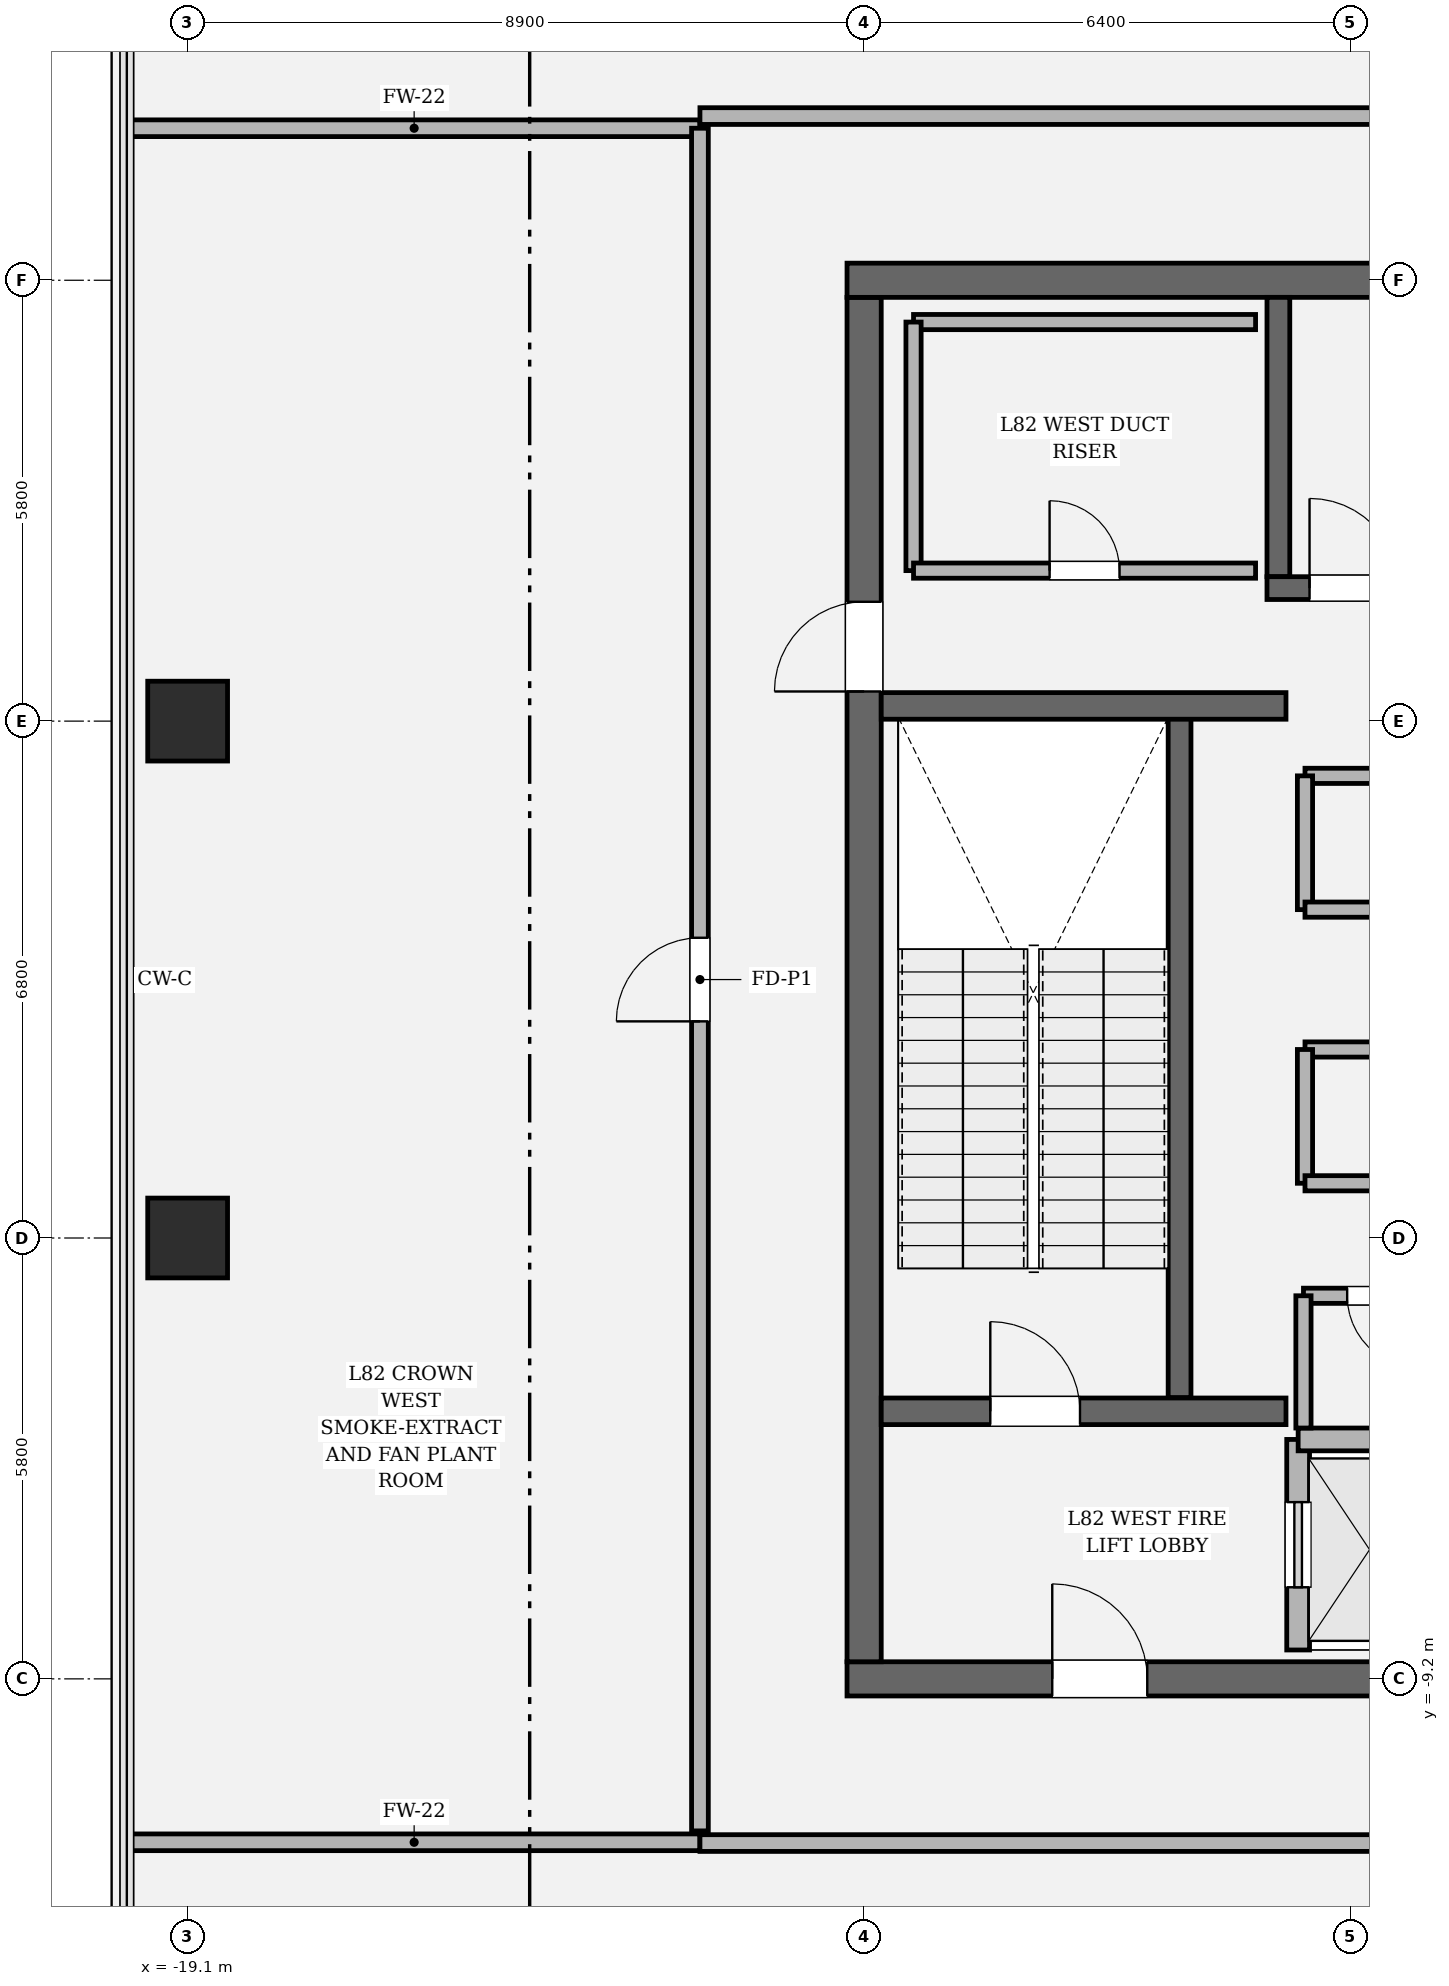
"""IFC4 building model, lengths in metres.
Left out: names, types, materials, properties, quantities, classifications, styles, units other than length and angle.
Written with IfcOpenShell. Run it as: python <this file> out.ifc"""

import sys

from ifc_helpers import new_model, si_unit, direction, frame, frame_2d, origin, origin_2d, place, context, subcontext, project, spatial, rectangle, hollow_rectangle, extrude, element, fill, save


model = new_model("IFC4")
c1 = context("Model", 3, precision=1e-05, world=origin(), true_north=direction((0.0, 1.0)))
c2 = subcontext(c1, "Body", "Model", "MODEL_VIEW")
j1 = project(units=[si_unit("LENGTHUNIT", "METRE"), si_unit("PLANEANGLEUNIT", "RADIAN")], contexts=[c1])
p1 = place(None, origin())
s1 = spatial("IfcSite", under=j1, at=p1, CompositionType="ELEMENT")
p2 = place(p1, origin())
s2 = spatial("IfcBuilding", under=s1, at=p2, CompositionType="ELEMENT")
p3 = place(p2, frame((0.0, 0.0, 348.3)))
s3 = spatial("IfcBuildingStorey", under=s2, at=p3, CompositionType="ELEMENT", Elevation=348.3)
p4 = place(p3, frame((10.425, -9.2, 0.0), z_axis=(0.0, 0.0, 1.0), x_axis=(-1.0, 0.0, 0.0)))
e1 = element("IfcWall", 1, at=p4, inside=s3, PredefinedType="SHEAR", context=c2, shape_type="SweptSolid", body=[
    extrude(rectangle(XDim=20.85, YDim=0.45, at=frame_2d((10.425, 0.0))), origin(), (0.0, 0.0, 1.0), 4.5),
])
p5 = place(p4, frame((2.7, 0.0, 0.0)))
e2 = element("IfcOpeningElement", 2, at=p5, cuts=e1, PredefinedType="OPENING", context=c2, shape_type="SweptSolid", body=[
    extrude(rectangle(XDim=1.25, YDim=2.25, at=frame_2d((0.625, 1.125))), frame((0.0, 0.235, 0.0), z_axis=(0.0, -1.0, 0.0), x_axis=(1.0, 0.0, 0.0)), (0.0, 0.0, 1.0), 0.47),
])
p6 = place(p4, frame((16.9, 0.0, 0.0)))
e3 = element("IfcOpeningElement", 3, at=p6, cuts=e1, PredefinedType="OPENING", context=c2, shape_type="SweptSolid", body=[
    extrude(rectangle(XDim=1.25, YDim=2.25, at=frame_2d((0.625, 1.125))), frame((0.0, 0.235, 0.0), z_axis=(0.0, -1.0, 0.0), x_axis=(1.0, 0.0, 0.0)), (0.0, 0.0, 1.0), 0.47),
])
p7 = place(p3, frame((-10.2, -8.975, 0.0), z_axis=(0.0, 0.0, 1.0), x_axis=(0.0, 1.0, 0.0)))
e4 = element("IfcWall", 4, at=p7, inside=s3, PredefinedType="SHEAR", context=c2, shape_type="SweptSolid", body=[
    extrude(rectangle(XDim=17.95, YDim=0.45, at=frame_2d((8.975, 0.0))), origin(), (0.0, 0.0, 1.0), 4.5),
])
p8 = place(p7, frame((12.765, 0.0, 0.0)))
e5 = element("IfcOpeningElement", 5, at=p8, cuts=e4, PredefinedType="OPENING", context=c2, shape_type="SweptSolid", body=[
    extrude(rectangle(XDim=1.18, YDim=2.2, at=frame_2d((0.59, 1.1))), frame((0.0, 0.235, 0.0), z_axis=(0.0, -1.0, 0.0), x_axis=(1.0, 0.0, 0.0)), (0.0, 0.0, 1.0), 0.47),
])
p9 = place(p3, frame((-10.425, 9.2, 0.0), z_axis=(0.0, 0.0, 1.0), x_axis=(1.0, 0.0, 0.0)))
e6 = element("IfcWall", 6, at=p9, inside=s3, PredefinedType="SHEAR", context=c2, shape_type="SweptSolid", body=[
    extrude(rectangle(XDim=20.85, YDim=0.45, at=frame_2d((10.425, 0.0))), origin(), (0.0, 0.0, 1.0), 4.5),
])
p10 = place(p3, frame((-6.05, -5.5, 0.0), z_axis=(0.0, 0.0, 1.0), x_axis=(0.0, 1.0, 0.0)))
e7 = element("IfcWall", 7, at=p10, inside=s3, PredefinedType="SOLIDWALL", context=c2, shape_type="SweptSolid", body=[
    extrude(rectangle(XDim=8.95, YDim=0.3, at=frame_2d((4.475, 0.0))), origin(), (0.0, 0.0, 1.0), 4.5),
])
p11 = place(p3, frame((-4.75, 5.3, 0.0), z_axis=(0.0, 0.0, 1.0), x_axis=(0.0, 1.0, 0.0)))
e8 = element("IfcWall", 8, at=p11, inside=s3, PredefinedType="SOLIDWALL", context=c2, shape_type="SweptSolid", body=[
    extrude(rectangle(XDim=3.675, YDim=0.3, at=frame_2d((1.837, 0.0))), origin(), (0.0, 0.0, 1.0), 4.5),
])
p12 = place(p3, frame((-4.9, 5.15, 0.0), z_axis=(0.0, 0.0, 1.0), x_axis=(1.0, 0.0, 0.0)))
e9 = element("IfcWall", 9, at=p12, inside=s3, PredefinedType="SOLIDWALL", context=c2, shape_type="SweptSolid", body=[
    extrude(rectangle(XDim=9.8, YDim=0.3, at=frame_2d((4.9, 0.0))), origin(), (0.0, 0.0, 1.0), 4.5),
])
p13 = place(p12, frame((0.56, 0.0, 0.0)))
e10 = element("IfcOpeningElement", 10, at=p13, cuts=e9, PredefinedType="OPENING", context=c2, shape_type="SweptSolid", body=[
    extrude(rectangle(XDim=1.18, YDim=2.2, at=frame_2d((0.59, 1.1))), frame((0.0, 0.16, 0.0), z_axis=(0.0, -1.0, 0.0), x_axis=(1.0, 0.0, 0.0)), (0.0, 0.0, 1.0), 0.32),
])
p14 = place(p3, frame((-9.975, -5.68, 0.0), z_axis=(0.0, 0.0, 1.0), x_axis=(1.0, 0.0, 0.0)))
e11 = element("IfcWall", 11, at=p14, inside=s3, PredefinedType="SOLIDWALL", context=c2, shape_type="SweptSolid", body=[
    extrude(rectangle(XDim=5.325, YDim=0.35, at=frame_2d((2.663, 0.0))), origin(), (0.0, 0.0, 1.0), 4.5),
])
p15 = place(p14, frame((1.435, 0.0, 0.0)))
e12 = element("IfcOpeningElement", 12, at=p15, cuts=e11, PredefinedType="OPENING", context=c2, shape_type="SweptSolid", body=[
    extrude(rectangle(XDim=1.18, YDim=2.2, at=frame_2d((0.59, 1.1))), frame((0.0, 0.185, 0.0), z_axis=(0.0, -1.0, 0.0), x_axis=(1.0, 0.0, 0.0)), (0.0, 0.0, 1.0), 0.37),
])
p16 = place(p3, frame((-9.975, 3.6, 0.0), z_axis=(0.0, 0.0, 1.0), x_axis=(1.0, 0.0, 0.0)))
e13 = element("IfcWall", 13, at=p16, inside=s3, PredefinedType="SOLIDWALL", context=c2, shape_type="SweptSolid", body=[
    extrude(rectangle(XDim=5.325, YDim=0.35, at=frame_2d((2.663, 0.0))), origin(), (0.0, 0.0, 1.0), 4.5),
])
for number, where, z_axis, x_axis in (
    (14, (-19.1, 3.4, 0.0), (0.0, 0.0, 1.0), (1.0, 0.0, 0.0)),
    (15, (-19.1, -3.4, 0.0), (0.0, 0.0, 1.0), (1.0, 0.0, 0.0)),
):
    element("IfcColumn", number, at=place(p3, frame(where, z_axis=z_axis, x_axis=x_axis)), inside=s3, PredefinedType="COLUMN", context=c2, shape_type="SweptSolid", body=[
        extrude(hollow_rectangle(XDim=1.05, YDim=1.05, WallThickness=0.03, at=origin_2d()), origin(), (0.0, 0.0, 1.0), 4.5),
    ])
p17 = place(p3, frame((-4.49, -8.82, 0.0), z_axis=(0.0, 0.0, 1.0), x_axis=(0.0, 1.0, 0.0)))
e16 = element("IfcWall", 16, at=p17, inside=s3, PredefinedType="SOLIDWALL", context=c2, shape_type="SweptSolid", body=[
    extrude(rectangle(XDim=2.77, YDim=0.3, at=frame_2d((1.385, 0.0))), origin(), (0.0, 0.0, 1.0), 4.22),
])
p18 = place(p17, frame((0.825, 0.0, 0.0)))
e17 = element("IfcOpeningElement", 17, at=p18, cuts=e16, PredefinedType="OPENING", context=c2, shape_type="SweptSolid", body=[
    extrude(rectangle(XDim=1.12, YDim=2.25, at=frame_2d((0.56, 1.125))), frame((0.0, 0.16, 0.0), z_axis=(0.0, -1.0, 0.0), x_axis=(1.0, 0.0, 0.0)), (0.0, 0.0, 1.0), 0.32),
])
p19 = place(p3, frame((-4.49, -6.05, 0.0), z_axis=(0.0, 0.0, 1.0), x_axis=(1.0, 0.0, 0.0)))
e18 = element("IfcWall", 18, at=p19, inside=s3, PredefinedType="SOLIDWALL", context=c2, shape_type="SweptSolid", body=[
    extrude(rectangle(XDim=1.88, YDim=0.3, at=frame_2d((0.94, 0.0))), origin(), (0.0, 0.0, 1.0), 4.22),
])
p20 = place(p3, frame((-2.32, -4.16, 0.0), z_axis=(0.0, 0.0, 1.0), x_axis=(-1.0, 0.0, 0.0)))
e19 = element("IfcWall", 19, at=p20, inside=s3, PredefinedType="SOLIDWALL", context=c2, shape_type="SweptSolid", body=[
    extrude(rectangle(XDim=2.1, YDim=0.2, at=frame_2d((1.05, 0.0))), origin(), (0.0, 0.0, 1.0), 4.22),
])
p21 = place(p20, frame((0.575, 0.0, 0.0)))
e20 = element("IfcOpeningElement", 20, at=p21, cuts=e19, PredefinedType="OPENING", context=c2, shape_type="SweptSolid", body=[
    extrude(rectangle(XDim=0.95, YDim=2.15, at=frame_2d((0.475, 1.075))), frame((0.0, 0.11, 0.0), z_axis=(0.0, -1.0, 0.0), x_axis=(1.0, 0.0, 0.0)), (0.0, 0.0, 1.0), 0.22),
])
p22 = place(p3, frame((-4.42, -4.16, 0.0), z_axis=(0.0, 0.0, 1.0), x_axis=(0.0, -1.0, 0.0)))
e21 = element("IfcWall", 21, at=p22, inside=s3, PredefinedType="SOLIDWALL", context=c2, shape_type="SweptSolid", body=[
    extrude(rectangle(XDim=1.74, YDim=0.2, at=frame_2d((0.87, 0.0))), origin(), (0.0, 0.0, 1.0), 4.22),
])
p23 = place(p3, frame((4.4, -0.92, 0.0), z_axis=(0.0, 0.0, 1.0), x_axis=(-1.0, 0.0, 0.0)))
e22 = element("IfcWall", 22, at=p23, inside=s3, PredefinedType="SOLIDWALL", context=c2, shape_type="SweptSolid", body=[
    extrude(rectangle(XDim=8.8, YDim=0.2, at=frame_2d((4.4, 0.0))), origin(), (0.0, 0.0, 1.0), 4.22),
])
p24 = place(p3, frame((-4.4, -0.92, 0.0), z_axis=(0.0, 0.0, 1.0), x_axis=(0.0, -1.0, 0.0)))
e23 = element("IfcWall", 23, at=p24, inside=s3, PredefinedType="SOLIDWALL", context=c2, shape_type="SweptSolid", body=[
    extrude(rectangle(XDim=1.76, YDim=0.2, at=frame_2d((0.88, 0.0))), origin(), (0.0, 0.0, 1.0), 4.22),
])
for number, where, z_axis, x_axis in (
    (24, (-4.4, -2.68, 0.0), (0.0, 0.0, 1.0), (1.0, 0.0, 0.0)),
    (25, (4.4, 2.68, 0.0), (0.0, 0.0, 1.0), (-1.0, 0.0, 0.0)),
):
    element("IfcWall", number, at=place(p3, frame(where, z_axis=z_axis, x_axis=x_axis)), inside=s3, PredefinedType="SOLIDWALL", context=c2, shape_type="SweptSolid", body=[
        extrude(rectangle(XDim=8.8, YDim=0.2, at=frame_2d((4.4, 0.0))), origin(), (0.0, 0.0, 1.0), 4.22),
    ])
p25 = place(p3, frame((-4.4, 2.68, 0.0), z_axis=(0.0, 0.0, 1.0), x_axis=(0.0, -1.0, 0.0)))
e26 = element("IfcWall", 26, at=p25, inside=s3, PredefinedType="SOLIDWALL", context=c2, shape_type="SweptSolid", body=[
    extrude(rectangle(XDim=1.76, YDim=0.2, at=frame_2d((0.88, 0.0))), origin(), (0.0, 0.0, 1.0), 4.22),
])
p26 = place(p3, frame((-4.4, 0.92, 0.0), z_axis=(0.0, 0.0, 1.0), x_axis=(1.0, 0.0, 0.0)))
e27 = element("IfcWall", 27, at=p26, inside=s3, PredefinedType="SOLIDWALL", context=c2, shape_type="SweptSolid", body=[
    extrude(rectangle(XDim=8.8, YDim=0.2, at=frame_2d((4.4, 0.0))), origin(), (0.0, 0.0, 1.0), 4.22),
])
p27 = place(p3, frame((-5.05, 8.65, 0.0), z_axis=(0.0, 0.0, 1.0), x_axis=(-1.0, 0.0, 0.0)))
e28 = element("IfcWall", 28, at=p27, inside=s3, PredefinedType="SOLIDWALL", context=c2, shape_type="SweptSolid", body=[
    extrude(rectangle(XDim=4.5, YDim=0.2, at=frame_2d((2.25, 0.0))), origin(), (0.0, 0.0, 1.0), 4.22),
])
p28 = place(p3, frame((-9.55, 8.65, 0.0), z_axis=(0.0, 0.0, 1.0), x_axis=(0.0, -1.0, 0.0)))
e29 = element("IfcWall", 29, at=p28, inside=s3, PredefinedType="SOLIDWALL", context=c2, shape_type="SweptSolid", body=[
    extrude(rectangle(XDim=3.27, YDim=0.2, at=frame_2d((1.635, 0.0))), origin(), (0.0, 0.0, 1.0), 4.22),
])
p29 = place(p3, frame((-9.55, 5.38, 0.0), z_axis=(0.0, 0.0, 1.0), x_axis=(1.0, 0.0, 0.0)))
e30 = element("IfcWall", 30, at=p29, inside=s3, PredefinedType="SOLIDWALL", context=c2, shape_type="SweptSolid", body=[
    extrude(rectangle(XDim=4.5, YDim=0.2, at=frame_2d((2.25, 0.0))), origin(), (0.0, 0.0, 1.0), 4.22),
])
p30 = place(p29, frame((1.79, 0.0, 0.0)))
e31 = element("IfcOpeningElement", 31, at=p30, cuts=e30, PredefinedType="OPENING", context=c2, shape_type="SweptSolid", body=[
    extrude(rectangle(XDim=0.92, YDim=2.1, at=frame_2d((0.46, 1.05))), frame((0.0, 0.11, 0.0), z_axis=(0.0, -1.0, 0.0), x_axis=(1.0, 0.0, 0.0)), (0.0, 0.0, 1.0), 0.22),
])
p31 = place(p3, frame((-19.88, -11.35, 0.0), z_axis=(0.0, 0.0, 1.0), x_axis=(1.0, 0.0, 0.0)))
e32 = element("IfcWall", 32, at=p31, inside=s3, PredefinedType="SOLIDWALL", context=c2, shape_type="SweptSolid", body=[
    extrude(rectangle(XDim=7.52, YDim=0.22, at=frame_2d((3.76, 0.0))), origin(), (0.0, 0.0, 1.0), 2.934),
])
p32 = place(p3, frame((-12.36, -11.36, 0.0), z_axis=(0.0, 0.0, 1.0), x_axis=(1.0, 0.0, 0.0)))
e33 = element("IfcWall", 33, at=p32, inside=s3, PredefinedType="SOLIDWALL", context=c2, shape_type="SweptSolid", body=[
    extrude(rectangle(XDim=24.72, YDim=0.22, at=frame_2d((12.36, 0.0))), origin(), (0.0, 0.0, 1.0), 2.934),
])
p33 = place(p32, frame((11.81, 0.0, 0.0)))
e34 = element("IfcOpeningElement", 34, at=p33, cuts=e33, PredefinedType="OPENING", context=c2, shape_type="SweptSolid", body=[
    extrude(rectangle(XDim=1.1, YDim=2.2, at=frame_2d((0.55, 1.1))), frame((0.0, 0.12, 0.0), z_axis=(0.0, -1.0, 0.0), x_axis=(1.0, 0.0, 0.0)), (0.0, 0.0, 1.0), 0.24),
])
p34 = place(p3, frame((-19.88, 11.2, 0.0), z_axis=(0.0, 0.0, 1.0), x_axis=(1.0, 0.0, 0.0)))
e35 = element("IfcWall", 35, at=p34, inside=s3, PredefinedType="SOLIDWALL", context=c2, shape_type="SweptSolid", body=[
    extrude(rectangle(XDim=7.52, YDim=0.22, at=frame_2d((3.76, 0.0))), origin(), (0.0, 0.0, 1.0), 2.934),
])
p35 = place(p3, frame((-12.36, 11.2, 0.0), z_axis=(0.0, 0.0, 1.0), x_axis=(0.0, -1.0, 0.0)))
e36 = element("IfcWall", 36, at=p35, inside=s3, PredefinedType="SOLIDWALL", context=c2, shape_type="SweptSolid", body=[
    extrude(rectangle(XDim=22.4, YDim=0.22, at=frame_2d((11.2, 0.0))), origin(), (0.0, 0.0, 1.0), 2.934),
])
p36 = place(p35, frame((10.65, 0.0, 0.0)))
e37 = element("IfcOpeningElement", 37, at=p36, cuts=e36, PredefinedType="OPENING", context=c2, shape_type="SweptSolid", body=[
    extrude(rectangle(XDim=1.1, YDim=2.2, at=frame_2d((0.55, 1.1))), frame((0.0, 0.12, 0.0), z_axis=(0.0, -1.0, 0.0), x_axis=(1.0, 0.0, 0.0)), (0.0, 0.0, 1.0), 0.24),
])
p37 = place(p3, frame((12.36, 11.36, 0.0), z_axis=(0.0, 0.0, 1.0), x_axis=(-1.0, 0.0, 0.0)))
e38 = element("IfcWall", 38, at=p37, inside=s3, PredefinedType="SOLIDWALL", context=c2, shape_type="SweptSolid", body=[
    extrude(rectangle(XDim=24.72, YDim=0.22, at=frame_2d((12.36, 0.0))), origin(), (0.0, 0.0, 1.0), 2.934),
])
p38 = place(p37, frame((11.81, 0.0, 0.0)))
e39 = element("IfcOpeningElement", 39, at=p38, cuts=e38, PredefinedType="OPENING", context=c2, shape_type="SweptSolid", body=[
    extrude(rectangle(XDim=1.1, YDim=2.2, at=frame_2d((0.55, 1.1))), frame((0.0, 0.12, 0.0), z_axis=(0.0, -1.0, 0.0), x_axis=(1.0, 0.0, 0.0)), (0.0, 0.0, 1.0), 0.24),
])
p39 = place(p15, origin())
e40 = element("IfcDoor", 40, at=p39, inside=s3, OperationType="SINGLE_SWING_LEFT", PredefinedType="DOOR", context=c2, shape_type="SweptSolid", body=[
    extrude(rectangle(XDim=1.18, YDim=2.2, at=frame_2d((0.59, 1.1))), frame((0.0, 0.025, 0.0), z_axis=(0.0, -1.0, 0.0), x_axis=(1.0, 0.0, 0.0)), (0.0, 0.0, 1.0), 0.05),
])
fill(e12, e40)
p40 = place(p13, origin())
e41 = element("IfcDoor", 41, at=p40, inside=s3, OperationType="SINGLE_SWING_LEFT", PredefinedType="DOOR", context=c2, shape_type="SweptSolid", body=[
    extrude(rectangle(XDim=1.18, YDim=2.2, at=frame_2d((0.59, 1.1))), frame((0.0, 0.025, 0.0), z_axis=(0.0, -1.0, 0.0), x_axis=(1.0, 0.0, 0.0)), (0.0, 0.0, 1.0), 0.05),
])
fill(e10, e41)
p41 = place(p6, origin())
e42 = element("IfcDoor", 42, at=p41, inside=s3, OperationType="SINGLE_SWING_RIGHT", PredefinedType="DOOR", context=c2, shape_type="SweptSolid", body=[
    extrude(rectangle(XDim=1.25, YDim=2.25, at=frame_2d((0.625, 1.125))), frame((0.0, 0.025, 0.0), z_axis=(0.0, -1.0, 0.0), x_axis=(1.0, 0.0, 0.0)), (0.0, 0.0, 1.0), 0.05),
])
fill(e3, e42)
p42 = place(p8, origin())
e43 = element("IfcDoor", 43, at=p42, inside=s3, OperationType="SINGLE_SWING_LEFT", PredefinedType="DOOR", context=c2, shape_type="SweptSolid", body=[
    extrude(rectangle(XDim=1.18, YDim=2.2, at=frame_2d((0.59, 1.1))), frame((0.0, 0.025, 0.0), z_axis=(0.0, -1.0, 0.0), x_axis=(1.0, 0.0, 0.0)), (0.0, 0.0, 1.0), 0.05),
])
fill(e5, e43)
p43 = place(p18, origin())
e44 = element("IfcDoor", 44, at=p43, inside=s3, OperationType="SLIDING_TO_LEFT", PredefinedType="DOOR", context=c2, shape_type="SweptSolid", body=[
    extrude(rectangle(XDim=1.12, YDim=2.25, at=frame_2d((0.56, 1.125))), frame((0.0, 0.025, 0.0), z_axis=(0.0, -1.0, 0.0), x_axis=(1.0, 0.0, 0.0)), (0.0, 0.0, 1.0), 0.05),
])
fill(e17, e44)
p44 = place(p21, origin())
e45 = element("IfcDoor", 45, at=p44, inside=s3, OperationType="SINGLE_SWING_LEFT", PredefinedType="DOOR", context=c2, shape_type="SweptSolid", body=[
    extrude(rectangle(XDim=0.95, YDim=2.15, at=frame_2d((0.475, 1.075))), frame((0.0, 0.025, 0.0), z_axis=(0.0, -1.0, 0.0), x_axis=(1.0, 0.0, 0.0)), (0.0, 0.0, 1.0), 0.05),
])
fill(e20, e45)
p45 = place(p30, origin())
e46 = element("IfcDoor", 46, at=p45, inside=s3, OperationType="SINGLE_SWING_LEFT", PredefinedType="DOOR", context=c2, shape_type="SweptSolid", body=[
    extrude(rectangle(XDim=0.92, YDim=2.1, at=frame_2d((0.46, 1.05))), frame((0.0, 0.025, 0.0), z_axis=(0.0, -1.0, 0.0), x_axis=(1.0, 0.0, 0.0)), (0.0, 0.0, 1.0), 0.05),
])
fill(e31, e46)
p46 = place(p36, origin())
e47 = element("IfcDoor", 47, at=p46, inside=s3, OperationType="SINGLE_SWING_RIGHT", PredefinedType="DOOR", context=c2, shape_type="SweptSolid", body=[
    extrude(rectangle(XDim=1.1, YDim=2.2, at=frame_2d((0.55, 1.1))), frame((0.0, 0.025, 0.0), z_axis=(0.0, -1.0, 0.0), x_axis=(1.0, 0.0, 0.0)), (0.0, 0.0, 1.0), 0.05),
])
fill(e37, e47)
save(model, sys.argv[1])
